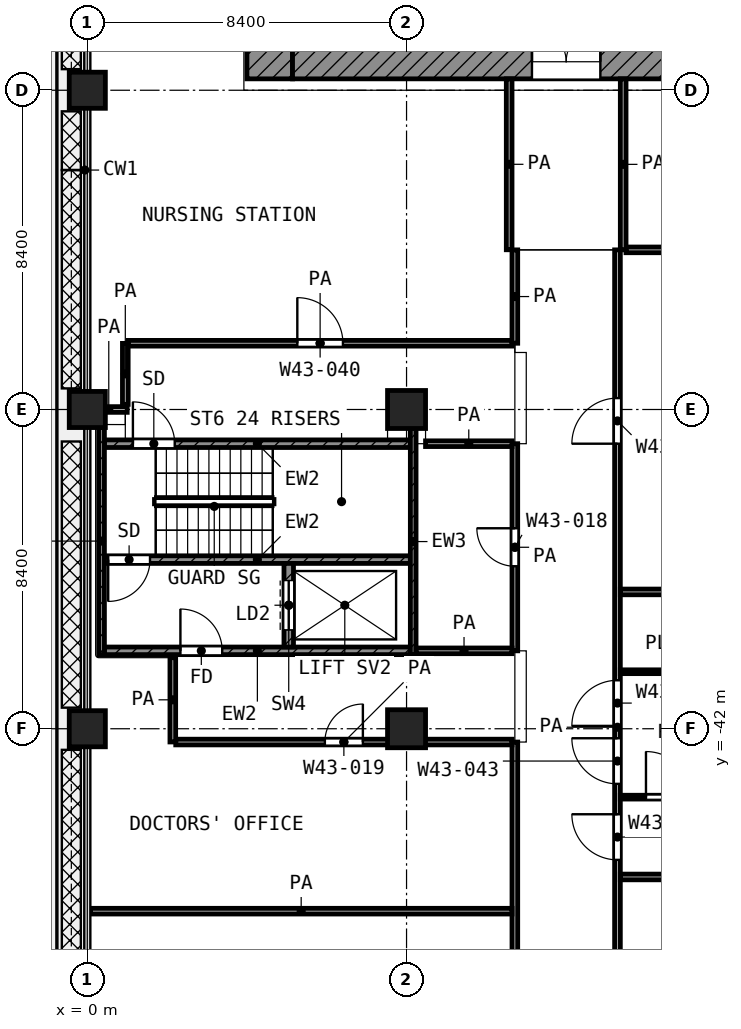
"""IFC4 building model, lengths in metres.
Left out: names, types, materials, properties, quantities, classifications, styles, units other than length and angle.
Written with IfcOpenShell. Run it as: python <this file> out.ifc"""

import sys

from ifc_helpers import new_model, si_unit, direction, frame, frame_2d, origin, origin_2d, place, context, subcontext, project, spatial, rectangle, extrude, element, fill, save


model = new_model("IFC4")
c1 = context("Model", 3, precision=1e-05, world=origin(), true_north=direction((0.0, 1.0)))
c2 = subcontext(c1, "Body", "Model", "MODEL_VIEW")
j1 = project(units=[si_unit("LENGTHUNIT", "METRE"), si_unit("PLANEANGLEUNIT", "RADIAN")], contexts=[c1])
p1 = place(None, origin())
s1 = spatial("IfcSite", under=j1, at=p1, CompositionType="ELEMENT")
p2 = place(p1, origin())
s2 = spatial("IfcBuilding", under=s1, at=p2, CompositionType="ELEMENT")
p3 = place(p2, frame((0.0, 0.0, 187.8)))
s3 = spatial("IfcBuildingStorey", under=s2, at=p3, CompositionType="ELEMENT", Elevation=187.8)
for number, where, z_axis, x_axis in (
    (1, (0.0, -25.2, 0.0), (0.0, 0.0, 1.0), (1.0, 0.0, 0.0)),
    (2, (0.0, -33.6, 0.0), (0.0, 0.0, 1.0), (1.0, 0.0, 0.0)),
):
    element("IfcColumn", number, at=place(p3, frame(where, z_axis=z_axis, x_axis=x_axis)), inside=s3, PredefinedType="COLUMN", context=c2, shape_type="SweptSolid", body=[
        extrude(rectangle(XDim=0.95, YDim=0.95, at=origin_2d()), origin(), (0.0, 0.0, 1.0), 4.2),
    ])
p4 = place(p3, frame((8.4, -33.6, 0.0), z_axis=(0.0, 0.0, 1.0), x_axis=(1.0, 0.0, 0.0)))
e3 = element("IfcColumn", 3, at=p4, inside=s3, PredefinedType="COLUMN", context=c2, shape_type="SweptSolid", body=[
    extrude(rectangle(XDim=1.0, YDim=1.0, at=origin_2d()), origin(), (0.0, 0.0, 1.0), 4.2),
])
p5 = place(p3, frame((0.0, -42.0, 0.0), z_axis=(0.0, 0.0, 1.0), x_axis=(1.0, 0.0, 0.0)))
e4 = element("IfcColumn", 4, at=p5, inside=s3, PredefinedType="COLUMN", context=c2, shape_type="SweptSolid", body=[
    extrude(rectangle(XDim=0.95, YDim=0.95, at=origin_2d()), origin(), (0.0, 0.0, 1.0), 4.2),
])
p6 = place(p3, frame((8.4, -42.0, 0.0), z_axis=(0.0, 0.0, 1.0), x_axis=(1.0, 0.0, 0.0)))
e5 = element("IfcColumn", 5, at=p6, inside=s3, PredefinedType="COLUMN", context=c2, shape_type="SweptSolid", body=[
    extrude(rectangle(XDim=1.0, YDim=1.0, at=origin_2d()), origin(), (0.0, 0.0, 1.0), 4.2),
])
p7 = place(p3, frame((4.8, -24.9, 0.0), z_axis=(0.0, 0.0, 1.0), x_axis=(0.0, 1.0, 0.0)))
e6 = element("IfcWall", 6, at=p7, inside=s3, PredefinedType="SHEAR", context=c2, shape_type="SweptSolid", body=[
    extrude(rectangle(XDim=19.5, YDim=1.2, at=frame_2d((9.75, 0.0))), origin(), (0.0, 0.0, 1.0), 3.6),
])
p8 = place(p7, frame((11.35, 0.0, 0.0)))
e7 = element("IfcOpeningElement", 7, at=p8, cuts=e6, PredefinedType="OPENING", context=c2, shape_type="SweptSolid", body=[
    extrude(rectangle(XDim=1.1, YDim=2.1, at=frame_2d((0.55, 1.05))), frame((0.0, 0.61, 0.0), z_axis=(0.0, -1.0, 0.0), x_axis=(1.0, 0.0, 0.0)), (0.0, 0.0, 1.0), 1.22),
])
p9 = place(p7, frame((2.05, 0.0, 0.0)))
e8 = element("IfcOpeningElement", 8, at=p9, cuts=e6, PredefinedType="OPENING", context=c2, shape_type="SweptSolid", body=[
    extrude(rectangle(XDim=1.1, YDim=2.1, at=frame_2d((0.55, 1.05))), frame((0.0, 0.61, 0.0), z_axis=(0.0, -1.0, 0.0), x_axis=(1.0, 0.0, 0.0)), (0.0, 0.0, 1.0), 1.22),
])
p10 = place(p3, frame((5.4, -24.45, 0.0), z_axis=(0.0, 0.0, 1.0), x_axis=(1.0, 0.0, 0.0)))
e9 = element("IfcWall", 9, at=p10, inside=s3, PredefinedType="SHEAR", context=c2, shape_type="SweptSolid", body=[
    extrude(rectangle(XDim=18.6, YDim=0.9, at=frame_2d((9.3, 0.0))), origin(), (0.0, 0.0, 1.0), 3.6),
])
p11 = place(p10, frame((6.3, 0.0, 0.0)))
e10 = element("IfcOpeningElement", 10, at=p11, cuts=e9, PredefinedType="OPENING", context=c2, shape_type="SweptSolid", body=[
    extrude(rectangle(XDim=1.8, YDim=2.1, at=frame_2d((0.9, 1.05))), frame((0.0, 0.46, 0.0), z_axis=(0.0, -1.0, 0.0), x_axis=(1.0, 0.0, 0.0)), (0.0, 0.0, 1.0), 0.92),
])
p12 = place(p3, frame((0.375, -40.05, 0.0), z_axis=(0.0, 0.0, 1.0), x_axis=(0.0, 1.0, 0.0)))
e11 = element("IfcWall", 11, at=p12, inside=s3, PredefinedType="SHEAR", context=c2, shape_type="SweptSolid", body=[
    extrude(rectangle(XDim=5.975, YDim=0.15, at=frame_2d((2.988, 0.0))), origin(), (0.0, 0.0, 1.0), 3.6),
])
p13 = place(p3, frame((8.575, -40.05, 0.0), z_axis=(0.0, 0.0, 1.0), x_axis=(0.0, 1.0, 0.0)))
e12 = element("IfcWall", 12, at=p13, inside=s3, PredefinedType="SHEAR", context=c2, shape_type="SweptSolid", body=[
    extrude(rectangle(XDim=5.95, YDim=0.15, at=frame_2d((2.975, 0.0))), origin(), (0.0, 0.0, 1.0), 3.6),
])
p14 = place(p3, frame((0.45, -34.5, 0.0), z_axis=(0.0, 0.0, 1.0), x_axis=(1.0, 0.0, 0.0)))
e13 = element("IfcWall", 13, at=p14, inside=s3, PredefinedType="SHEAR", context=c2, shape_type="SweptSolid", body=[
    extrude(rectangle(XDim=8.05, YDim=0.2, at=frame_2d((4.025, 0.0))), origin(), (0.0, 0.0, 1.0), 3.6),
])
p15 = place(p14, frame((0.75, 0.0, 0.0)))
e14 = element("IfcOpeningElement", 14, at=p15, cuts=e13, PredefinedType="OPENING", context=c2, shape_type="SweptSolid", body=[
    extrude(rectangle(XDim=1.1, YDim=2.1, at=frame_2d((0.55, 1.05))), frame((0.0, 0.11, 0.0), z_axis=(0.0, -1.0, 0.0), x_axis=(1.0, 0.0, 0.0)), (0.0, 0.0, 1.0), 0.22),
])
p16 = place(p3, frame((0.45, -37.55, 0.0), z_axis=(0.0, 0.0, 1.0), x_axis=(1.0, 0.0, 0.0)))
e15 = element("IfcWall", 15, at=p16, inside=s3, PredefinedType="SHEAR", context=c2, shape_type="SweptSolid", body=[
    extrude(rectangle(XDim=8.05, YDim=0.2, at=frame_2d((4.025, 0.0))), origin(), (0.0, 0.0, 1.0), 3.6),
])
p17 = place(p16, frame((0.1, 0.0, 0.0)))
e16 = element("IfcOpeningElement", 16, at=p17, cuts=e15, PredefinedType="OPENING", context=c2, shape_type="SweptSolid", body=[
    extrude(rectangle(XDim=1.1, YDim=2.1, at=frame_2d((0.55, 1.05))), frame((0.0, 0.11, 0.0), z_axis=(0.0, -1.0, 0.0), x_axis=(1.0, 0.0, 0.0)), (0.0, 0.0, 1.0), 0.22),
])
p18 = place(p3, frame((0.45, -39.95, 0.0), z_axis=(0.0, 0.0, 1.0), x_axis=(1.0, 0.0, 0.0)))
e17 = element("IfcWall", 17, at=p18, inside=s3, PredefinedType="SHEAR", context=c2, shape_type="SweptSolid", body=[
    extrude(rectangle(XDim=8.05, YDim=0.2, at=frame_2d((4.025, 0.0))), origin(), (0.0, 0.0, 1.0), 3.6),
])
p19 = place(p18, frame((2.0, 0.0, 0.0)))
e18 = element("IfcOpeningElement", 18, at=p19, cuts=e17, PredefinedType="OPENING", context=c2, shape_type="SweptSolid", body=[
    extrude(rectangle(XDim=1.1, YDim=2.1, at=frame_2d((0.55, 1.05))), frame((0.0, 0.11, 0.0), z_axis=(0.0, -1.0, 0.0), x_axis=(1.0, 0.0, 0.0)), (0.0, 0.0, 1.0), 0.22),
])
p20 = place(p3, frame((5.3, -39.85, 0.0), z_axis=(0.0, 0.0, 1.0), x_axis=(0.0, 1.0, 0.0)))
e19 = element("IfcWall", 19, at=p20, inside=s3, PredefinedType="SHEAR", context=c2, shape_type="SweptSolid", body=[
    extrude(rectangle(XDim=2.2, YDim=0.25, at=frame_2d((1.1, 0.0))), origin(), (0.0, 0.0, 1.0), 3.6),
])
p21 = place(p20, frame((0.45, 0.0, 0.0)))
e20 = element("IfcOpeningElement", 20, at=p21, cuts=e19, PredefinedType="OPENING", context=c2, shape_type="SweptSolid", body=[
    extrude(rectangle(XDim=1.3, YDim=2.1, at=frame_2d((0.65, 1.05))), frame((0.0, 0.135, 0.0), z_axis=(0.0, -1.0, 0.0), x_axis=(1.0, 0.0, 0.0)), (0.0, 0.0, 1.0), 0.27),
])
p22 = place(p3, frame((14.025, -43.8, 0.0), z_axis=(0.0, 0.0, 1.0), x_axis=(1.0, 0.0, 0.0)))
e21 = element("IfcWall", 21, at=p22, inside=s3, PredefinedType="PARTITIONING", context=c2, shape_type="SweptSolid", body=[
    extrude(rectangle(XDim=2.575, YDim=0.1, at=frame_2d((1.288, 0.0))), origin(), (0.0, 0.0, 1.0), 3.6),
])
p23 = place(p22, frame((0.675, 0.0, 0.0)))
e22 = element("IfcOpeningElement", 22, at=p23, cuts=e21, PredefinedType="OPENING", context=c2, shape_type="SweptSolid", body=[
    extrude(rectangle(XDim=1.2, YDim=2.1, at=frame_2d((0.6, 1.05))), frame((0.0, 0.06, 0.0), z_axis=(0.0, -1.0, 0.0), x_axis=(1.0, 0.0, 0.0)), (0.0, 0.0, 1.0), 0.12),
])
p24 = place(p3, frame((14.025, -40.5, 0.0), z_axis=(0.0, 0.0, 1.0), x_axis=(1.0, 0.0, 0.0)))
e23 = element("IfcWall", 23, at=p24, inside=s3, PredefinedType="PARTITIONING", context=c2, shape_type="SweptSolid", body=[
    extrude(rectangle(XDim=2.575, YDim=0.1, at=frame_2d((1.288, 0.0))), origin(), (0.0, 0.0, 1.0), 3.6),
])
p25 = place(p3, frame((0.08, -46.8, 0.0), z_axis=(0.0, 0.0, 1.0), x_axis=(1.0, 0.0, 0.0)))
e24 = element("IfcWall", 24, at=p25, inside=s3, PredefinedType="PARTITIONING", context=c2, shape_type="SweptSolid", body=[
    extrude(rectangle(XDim=11.095, YDim=0.15, at=frame_2d((5.547, 0.0))), origin(), (0.0, 0.0, 1.0), 3.6),
])
p26 = place(p3, frame((14.025, -45.9, 0.0), z_axis=(0.0, 0.0, 1.0), x_axis=(1.0, 0.0, 0.0)))
e25 = element("IfcWall", 25, at=p26, inside=s3, PredefinedType="PARTITIONING", context=c2, shape_type="SweptSolid", body=[
    extrude(rectangle(XDim=11.095, YDim=0.15, at=frame_2d((5.548, 0.0))), origin(), (0.0, 0.0, 1.0), 3.6),
])
p27 = place(p3, frame((2.327, -42.35, 0.0), z_axis=(0.0, 0.0, 1.0), x_axis=(1.0, 0.0, 0.0)))
e26 = element("IfcWall", 26, at=p27, inside=s3, PredefinedType="PARTITIONING", context=c2, shape_type="SweptSolid", body=[
    extrude(rectangle(XDim=8.848, YDim=0.15, at=frame_2d((4.424, 0.0))), origin(), (0.0, 0.0, 1.0), 3.6),
])
p28 = place(p27, frame((3.924, 0.0, 0.0)))
e27 = element("IfcOpeningElement", 27, at=p28, cuts=e26, PredefinedType="OPENING", context=c2, shape_type="SweptSolid", body=[
    extrude(rectangle(XDim=1.0, YDim=2.1, at=frame_2d((0.5, 1.05))), frame((0.0, 0.085, 0.0), z_axis=(0.0, -1.0, 0.0), x_axis=(1.0, 0.0, 0.0)), (0.0, 0.0, 1.0), 0.17),
])
p29 = place(p3, frame((8.65, -39.95, 0.0), z_axis=(0.0, 0.0, 1.0), x_axis=(1.0, 0.0, 0.0)))
e28 = element("IfcWall", 28, at=p29, inside=s3, PredefinedType="PARTITIONING", context=c2, shape_type="SweptSolid", body=[
    extrude(rectangle(XDim=2.525, YDim=0.15, at=frame_2d((1.263, 0.0))), origin(), (0.0, 0.0, 1.0), 3.6),
])
p30 = place(p3, frame((14.025, -38.4, 0.0), z_axis=(0.0, 0.0, 1.0), x_axis=(1.0, 0.0, 0.0)))
e29 = element("IfcWall", 29, at=p30, inside=s3, PredefinedType="PARTITIONING", context=c2, shape_type="SweptSolid", body=[
    extrude(rectangle(XDim=11.095, YDim=0.15, at=frame_2d((5.548, 0.0))), origin(), (0.0, 0.0, 1.0), 3.6),
])
p31 = place(p3, frame((8.9, -34.5, 0.0), z_axis=(0.0, 0.0, 1.0), x_axis=(1.0, 0.0, 0.0)))
e30 = element("IfcWall", 30, at=p31, inside=s3, PredefinedType="PARTITIONING", context=c2, shape_type="SweptSolid", body=[
    extrude(rectangle(XDim=2.275, YDim=0.15, at=frame_2d((1.138, 0.0))), origin(), (0.0, 0.0, 1.0), 3.6),
])
p32 = place(p3, frame((0.08, -33.6, 0.0), z_axis=(0.0, 0.0, 1.0), x_axis=(1.0, 0.0, 0.0)))
e31 = element("IfcWall", 31, at=p32, inside=s3, PredefinedType="PARTITIONING", context=c2, shape_type="SweptSolid", body=[
    extrude(rectangle(XDim=0.97, YDim=0.15, at=frame_2d((0.485, 0.0))), origin(), (0.0, 0.0, 1.0), 3.6),
])
p33 = place(p3, frame((1.077, -31.857, 0.0), z_axis=(0.0, 0.0, 1.0), x_axis=(1.0, 0.0, 0.0)))
e32 = element("IfcWall", 32, at=p33, inside=s3, PredefinedType="PARTITIONING", context=c2, shape_type="SweptSolid", body=[
    extrude(rectangle(XDim=10.098, YDim=0.15, at=frame_2d((5.049, 0.0))), origin(), (0.0, 0.0, 1.0), 3.6),
])
p34 = place(p33, frame((4.449, 0.0, 0.0)))
e33 = element("IfcOpeningElement", 33, at=p34, cuts=e32, PredefinedType="OPENING", context=c2, shape_type="SweptSolid", body=[
    extrude(rectangle(XDim=1.2, YDim=2.1, at=frame_2d((0.6, 1.05))), frame((0.0, 0.085, 0.0), z_axis=(0.0, -1.0, 0.0), x_axis=(1.0, 0.0, 0.0)), (0.0, 0.0, 1.0), 0.17),
])
p35 = place(p3, frame((14.175, -29.4, 0.0), z_axis=(0.0, 0.0, 1.0), x_axis=(1.0, 0.0, 0.0)))
e34 = element("IfcWall", 34, at=p35, inside=s3, PredefinedType="PARTITIONING", context=c2, shape_type="SweptSolid", body=[
    extrude(rectangle(XDim=15.15, YDim=0.15, at=frame_2d((7.575, 0.0))), origin(), (0.0, 0.0, 1.0), 3.6),
])
p36 = place(p3, frame((1.0, -33.465, 0.0), z_axis=(0.0, 0.0, 1.0), x_axis=(0.0, 1.0, 0.0)))
e35 = element("IfcWall", 35, at=p36, inside=s3, PredefinedType="PARTITIONING", context=c2, shape_type="SweptSolid", body=[
    extrude(rectangle(XDim=1.605, YDim=0.15, at=frame_2d((0.802, 0.0))), origin(), (0.0, 0.0, 1.0), 3.6),
])
p37 = place(p3, frame((2.25, -42.348, 0.0), z_axis=(0.0, 0.0, 1.0), x_axis=(0.0, 1.0, 0.0)))
e36 = element("IfcWall", 36, at=p37, inside=s3, PredefinedType="PARTITIONING", context=c2, shape_type="SweptSolid", body=[
    extrude(rectangle(XDim=2.218, YDim=0.15, at=frame_2d((1.109, 0.0))), origin(), (0.0, 0.0, 1.0), 3.6),
])
p38 = place(p3, frame((11.1, -29.397, 0.0), z_axis=(0.0, 0.0, 1.0), x_axis=(0.0, 1.0, 0.0)))
e37 = element("IfcWall", 37, at=p38, inside=s3, PredefinedType="PARTITIONING", context=c2, shape_type="SweptSolid", body=[
    extrude(rectangle(XDim=4.497, YDim=0.15, at=frame_2d((2.249, 0.0))), origin(), (0.0, 0.0, 1.0), 3.6),
])
p39 = place(p3, frame((11.25, -54.52, 0.0), z_axis=(0.0, 0.0, 1.0), x_axis=(0.0, 1.0, 0.0)))
e38 = element("IfcWall", 38, at=p39, inside=s3, PredefinedType="PARTITIONING", context=c2, shape_type="SweptSolid", body=[
    extrude(rectangle(XDim=12.17, YDim=0.15, at=frame_2d((6.085, 0.0))), origin(), (0.0, 0.0, 1.0), 3.6),
])
p40 = place(p39, frame((3.07, 0.0, 0.0)))
e39 = element("IfcOpeningElement", 39, at=p40, cuts=e38, PredefinedType="OPENING", context=c2, shape_type="SweptSolid", body=[
    extrude(rectangle(XDim=1.5, YDim=2.1, at=frame_2d((0.75, 1.05))), frame((0.0, 0.085, 0.0), z_axis=(0.0, -1.0, 0.0), x_axis=(1.0, 0.0, 0.0)), (0.0, 0.0, 1.0), 0.17),
])
p41 = place(p3, frame((11.25, -39.95, 0.0), z_axis=(0.0, 0.0, 1.0), x_axis=(0.0, 1.0, 0.0)))
e40 = element("IfcWall", 40, at=p41, inside=s3, PredefinedType="PARTITIONING", context=c2, shape_type="SweptSolid", body=[
    extrude(rectangle(XDim=5.45, YDim=0.15, at=frame_2d((2.725, 0.0))), origin(), (0.0, 0.0, 1.0), 3.6),
])
p42 = place(p41, frame((2.225, 0.0, 0.0)))
e41 = element("IfcOpeningElement", 41, at=p42, cuts=e40, PredefinedType="OPENING", context=c2, shape_type="SweptSolid", body=[
    extrude(rectangle(XDim=1.0, YDim=2.1, at=frame_2d((0.5, 1.05))), frame((0.0, 0.085, 0.0), z_axis=(0.0, -1.0, 0.0), x_axis=(1.0, 0.0, 0.0)), (0.0, 0.0, 1.0), 0.17),
])
p43 = place(p3, frame((11.25, -31.857, 0.0), z_axis=(0.0, 0.0, 1.0), x_axis=(0.0, 1.0, 0.0)))
e42 = element("IfcWall", 42, at=p43, inside=s3, PredefinedType="PARTITIONING", context=c2, shape_type="SweptSolid", body=[
    extrude(rectangle(XDim=2.457, YDim=0.15, at=frame_2d((1.229, 0.0))), origin(), (0.0, 0.0, 1.0), 3.6),
])
p44 = place(p3, frame((13.95, -54.52, 0.0), z_axis=(0.0, 0.0, 1.0), x_axis=(0.0, 1.0, 0.0)))
e43 = element("IfcWall", 43, at=p44, inside=s3, PredefinedType="PARTITIONING", context=c2, shape_type="SweptSolid", body=[
    extrude(rectangle(XDim=25.12, YDim=0.15, at=frame_2d((12.56, 0.0))), origin(), (0.0, 0.0, 1.0), 3.6),
])
p45 = place(p44, frame((20.02, 0.0, 0.0)))
e44 = element("IfcOpeningElement", 44, at=p45, cuts=e43, PredefinedType="OPENING", context=c2, shape_type="SweptSolid", body=[
    extrude(rectangle(XDim=1.2, YDim=2.1, at=frame_2d((0.6, 1.05))), frame((0.0, 0.085, 0.0), z_axis=(0.0, -1.0, 0.0), x_axis=(1.0, 0.0, 0.0)), (0.0, 0.0, 1.0), 0.17),
])
p46 = place(p44, frame((12.595, 0.0, 0.0)))
e45 = element("IfcOpeningElement", 45, at=p46, cuts=e43, PredefinedType="OPENING", context=c2, shape_type="SweptSolid", body=[
    extrude(rectangle(XDim=1.2, YDim=2.1, at=frame_2d((0.6, 1.05))), frame((0.0, 0.085, 0.0), z_axis=(0.0, -1.0, 0.0), x_axis=(1.0, 0.0, 0.0)), (0.0, 0.0, 1.0), 0.17),
])
p47 = place(p44, frame((11.07, 0.0, 0.0)))
e46 = element("IfcOpeningElement", 46, at=p47, cuts=e43, PredefinedType="OPENING", context=c2, shape_type="SweptSolid", body=[
    extrude(rectangle(XDim=1.2, YDim=2.1, at=frame_2d((0.6, 1.05))), frame((0.0, 0.085, 0.0), z_axis=(0.0, -1.0, 0.0), x_axis=(1.0, 0.0, 0.0)), (0.0, 0.0, 1.0), 0.17),
])
p48 = place(p44, frame((9.07, 0.0, 0.0)))
e47 = element("IfcOpeningElement", 47, at=p48, cuts=e43, PredefinedType="OPENING", context=c2, shape_type="SweptSolid", body=[
    extrude(rectangle(XDim=1.2, YDim=2.1, at=frame_2d((0.6, 1.05))), frame((0.0, 0.085, 0.0), z_axis=(0.0, -1.0, 0.0), x_axis=(1.0, 0.0, 0.0)), (0.0, 0.0, 1.0), 0.17),
])
p49 = place(p44, frame((5.12, 0.0, 0.0)))
e48 = element("IfcOpeningElement", 48, at=p49, cuts=e43, PredefinedType="OPENING", context=c2, shape_type="SweptSolid", body=[
    extrude(rectangle(XDim=1.2, YDim=2.1, at=frame_2d((0.6, 1.05))), frame((0.0, 0.085, 0.0), z_axis=(0.0, -1.0, 0.0), x_axis=(1.0, 0.0, 0.0)), (0.0, 0.0, 1.0), 0.17),
])
p50 = place(p44, frame((1.52, 0.0, 0.0)))
e49 = element("IfcOpeningElement", 49, at=p50, cuts=e43, PredefinedType="OPENING", context=c2, shape_type="SweptSolid", body=[
    extrude(rectangle(XDim=1.0, YDim=2.1, at=frame_2d((0.5, 1.05))), frame((0.0, 0.085, 0.0), z_axis=(0.0, -1.0, 0.0), x_axis=(1.0, 0.0, 0.0)), (0.0, 0.0, 1.0), 0.17),
])
p51 = place(p3, frame((14.1, -29.4, 0.0), z_axis=(0.0, 0.0, 1.0), x_axis=(0.0, 1.0, 0.0)))
e50 = element("IfcWall", 50, at=p51, inside=s3, PredefinedType="PARTITIONING", context=c2, shape_type="SweptSolid", body=[
    extrude(rectangle(XDim=4.5, YDim=0.15, at=frame_2d((2.25, 0.0))), origin(), (0.0, 0.0, 1.0), 3.6),
])
p52 = place(p11, origin())
e51 = element("IfcDoor", 51, at=p52, inside=s3, OperationType="DOUBLE_DOOR_SINGLE_SWING", PredefinedType="DOOR", context=c2, shape_type="SweptSolid", body=[
    extrude(rectangle(XDim=1.8, YDim=2.1, at=frame_2d((0.9, 1.05))), frame((0.0, 0.025, 0.0), z_axis=(0.0, -1.0, 0.0), x_axis=(1.0, 0.0, 0.0)), (0.0, 0.0, 1.0), 0.05),
])
fill(e10, e51)
p53 = place(p15, origin())
e52 = element("IfcDoor", 52, at=p53, inside=s3, OperationType="SINGLE_SWING_LEFT", PredefinedType="DOOR", context=c2, shape_type="SweptSolid", body=[
    extrude(rectangle(XDim=1.1, YDim=2.1, at=frame_2d((0.55, 1.05))), frame((0.0, 0.025, 0.0), z_axis=(0.0, -1.0, 0.0), x_axis=(1.0, 0.0, 0.0)), (0.0, 0.0, 1.0), 0.05),
])
fill(e14, e52)
p54 = place(p17, frame((1.1, 0.0, 0.0), z_axis=(0.0, 0.0, 1.0), x_axis=(-1.0, 0.0, 0.0)))
e53 = element("IfcDoor", 53, at=p54, inside=s3, OperationType="SINGLE_SWING_LEFT", PredefinedType="DOOR", context=c2, shape_type="SweptSolid", body=[
    extrude(rectangle(XDim=1.1, YDim=2.1, at=frame_2d((0.55, 1.05))), frame((0.0, 0.025, 0.0), z_axis=(0.0, -1.0, 0.0), x_axis=(1.0, 0.0, 0.0)), (0.0, 0.0, 1.0), 0.05),
])
fill(e16, e53)
p55 = place(p21, origin())
e54 = element("IfcDoor", 54, at=p55, inside=s3, OperationType="DOUBLE_DOOR_SLIDING", PredefinedType="DOOR", context=c2, shape_type="SweptSolid", body=[
    extrude(rectangle(XDim=1.3, YDim=2.1, at=frame_2d((0.65, 1.05))), frame((0.0, 0.025, 0.0), z_axis=(0.0, -1.0, 0.0), x_axis=(1.0, 0.0, 0.0)), (0.0, 0.0, 1.0), 0.05),
])
fill(e20, e54)
p56 = place(p19, origin())
e55 = element("IfcDoor", 55, at=p56, inside=s3, OperationType="SINGLE_SWING_LEFT", PredefinedType="DOOR", context=c2, shape_type="SweptSolid", body=[
    extrude(rectangle(XDim=1.1, YDim=2.1, at=frame_2d((0.55, 1.05))), frame((0.0, 0.025, 0.0), z_axis=(0.0, -1.0, 0.0), x_axis=(1.0, 0.0, 0.0)), (0.0, 0.0, 1.0), 0.05),
])
fill(e18, e55)
p57 = place(p34, origin())
e56 = element("IfcDoor", 56, at=p57, inside=s3, OperationType="SINGLE_SWING_LEFT", PredefinedType="DOOR", context=c2, shape_type="SweptSolid", body=[
    extrude(rectangle(XDim=1.2, YDim=2.1, at=frame_2d((0.6, 1.05))), frame((0.0, 0.025, 0.0), z_axis=(0.0, -1.0, 0.0), x_axis=(1.0, 0.0, 0.0)), (0.0, 0.0, 1.0), 0.05),
])
fill(e33, e56)
p58 = place(p42, origin())
e57 = element("IfcDoor", 57, at=p58, inside=s3, OperationType="SINGLE_SWING_RIGHT", PredefinedType="DOOR", context=c2, shape_type="SweptSolid", body=[
    extrude(rectangle(XDim=1.0, YDim=2.1, at=frame_2d((0.5, 1.05))), frame((0.0, 0.025, 0.0), z_axis=(0.0, -1.0, 0.0), x_axis=(1.0, 0.0, 0.0)), (0.0, 0.0, 1.0), 0.05),
])
fill(e41, e57)
p59 = place(p28, origin())
e58 = element("IfcDoor", 58, at=p59, inside=s3, OperationType="SINGLE_SWING_RIGHT", PredefinedType="DOOR", context=c2, shape_type="SweptSolid", body=[
    extrude(rectangle(XDim=1.0, YDim=2.1, at=frame_2d((0.5, 1.05))), frame((0.0, 0.025, 0.0), z_axis=(0.0, -1.0, 0.0), x_axis=(1.0, 0.0, 0.0)), (0.0, 0.0, 1.0), 0.05),
])
fill(e27, e58)
p60 = place(p45, origin())
e59 = element("IfcDoor", 59, at=p60, inside=s3, OperationType="SINGLE_SWING_LEFT", PredefinedType="DOOR", context=c2, shape_type="SweptSolid", body=[
    extrude(rectangle(XDim=1.2, YDim=2.1, at=frame_2d((0.6, 1.05))), frame((0.0, 0.025, 0.0), z_axis=(0.0, -1.0, 0.0), x_axis=(1.0, 0.0, 0.0)), (0.0, 0.0, 1.0), 0.05),
])
fill(e44, e59)
p61 = place(p46, origin())
e60 = element("IfcDoor", 60, at=p61, inside=s3, OperationType="SINGLE_SWING_LEFT", PredefinedType="DOOR", context=c2, shape_type="SweptSolid", body=[
    extrude(rectangle(XDim=1.2, YDim=2.1, at=frame_2d((0.6, 1.05))), frame((0.0, 0.025, 0.0), z_axis=(0.0, -1.0, 0.0), x_axis=(1.0, 0.0, 0.0)), (0.0, 0.0, 1.0), 0.05),
])
fill(e45, e60)
p62 = place(p47, origin())
e61 = element("IfcDoor", 61, at=p62, inside=s3, OperationType="SINGLE_SWING_RIGHT", PredefinedType="DOOR", context=c2, shape_type="SweptSolid", body=[
    extrude(rectangle(XDim=1.2, YDim=2.1, at=frame_2d((0.6, 1.05))), frame((0.0, 0.025, 0.0), z_axis=(0.0, -1.0, 0.0), x_axis=(1.0, 0.0, 0.0)), (0.0, 0.0, 1.0), 0.05),
])
fill(e46, e61)
p63 = place(p48, origin())
e62 = element("IfcDoor", 62, at=p63, inside=s3, OperationType="SINGLE_SWING_RIGHT", PredefinedType="DOOR", context=c2, shape_type="SweptSolid", body=[
    extrude(rectangle(XDim=1.2, YDim=2.1, at=frame_2d((0.6, 1.05))), frame((0.0, 0.025, 0.0), z_axis=(0.0, -1.0, 0.0), x_axis=(1.0, 0.0, 0.0)), (0.0, 0.0, 1.0), 0.05),
])
fill(e47, e62)
p64 = place(p23, origin())
e63 = element("IfcDoor", 63, at=p64, inside=s3, OperationType="SINGLE_SWING_LEFT", PredefinedType="DOOR", context=c2, shape_type="SweptSolid", body=[
    extrude(rectangle(XDim=1.2, YDim=2.1, at=frame_2d((0.6, 1.05))), frame((0.0, 0.025, 0.0), z_axis=(0.0, -1.0, 0.0), x_axis=(1.0, 0.0, 0.0)), (0.0, 0.0, 1.0), 0.05),
])
fill(e22, e63)
save(model, sys.argv[1])
